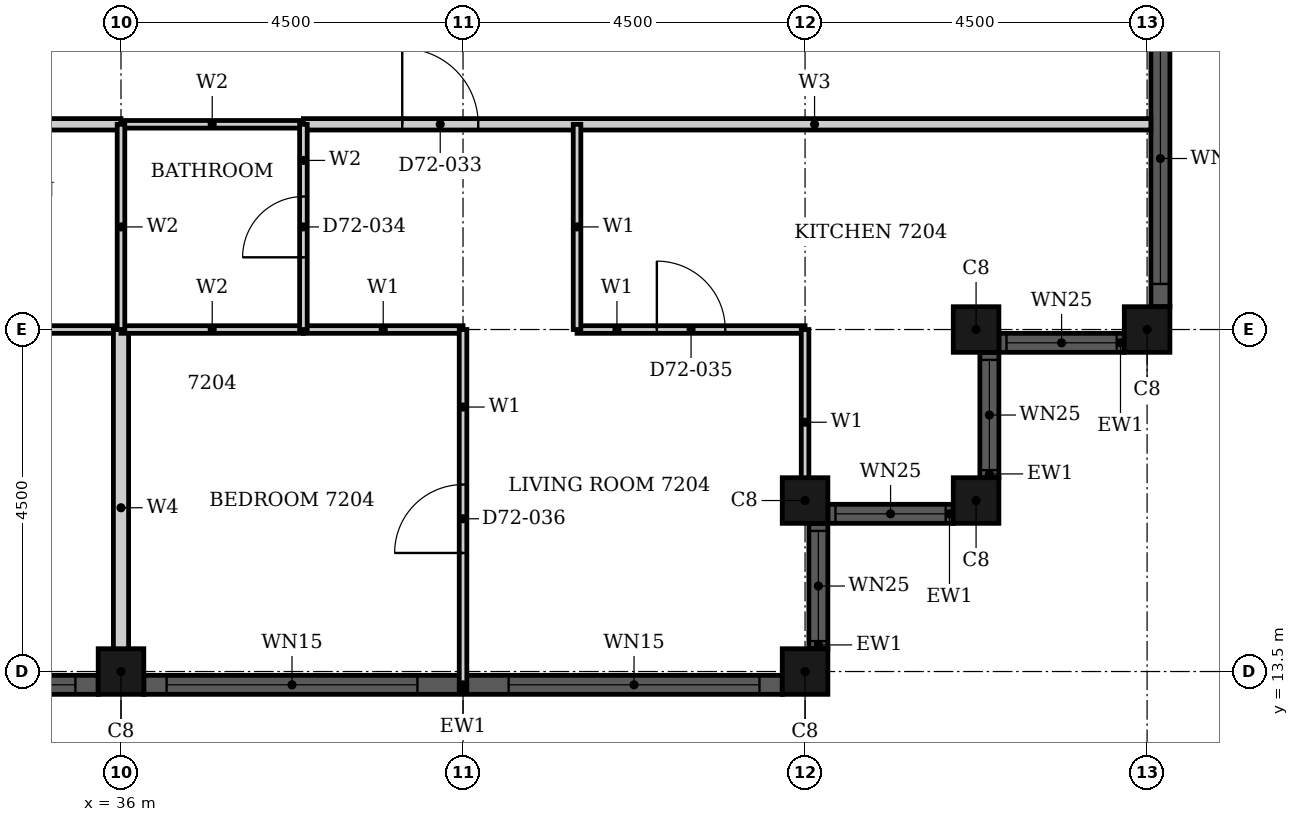
"""IFC4 building model, lengths in metres.
Left out: names, types, materials, properties, quantities, classifications, styles, units other than length and angle.
Written with IfcOpenShell. Run it as: python <this file> out.ifc"""

import sys

from ifc_helpers import new_model, si_unit, direction, frame, frame_2d, origin, origin_2d, place, context, subcontext, project, spatial, rectangle, hollow_rectangle, extrude, element, fill, save


model = new_model("IFC4")
c1 = context("Model", 3, precision=1e-05, world=origin(), true_north=direction((0.0, 1.0)))
c2 = subcontext(c1, "Body", "Model", "MODEL_VIEW")
j1 = project(units=[si_unit("LENGTHUNIT", "METRE"), si_unit("PLANEANGLEUNIT", "RADIAN")], contexts=[c1])
p1 = place(None, origin())
s1 = spatial("IfcSite", under=j1, at=p1, CompositionType="ELEMENT")
p2 = place(p1, origin())
s2 = spatial("IfcBuilding", under=s1, at=p2, CompositionType="ELEMENT")
p3 = place(p2, frame((0.0, 0.0, 283.4)))
s3 = spatial("IfcBuildingStorey", under=s2, at=p3, CompositionType="ELEMENT", Elevation=283.4)
for number, where, z_axis, x_axis in (
    (1, (45.0, 13.5, 0.0), (0.0, 0.0, 1.0), (1.0, 0.0, 0.0)),
    (2, (45.0, 15.75, 0.0), (0.0, 0.0, 1.0), (1.0, 0.0, 0.0)),
    (3, (47.25, 15.75, 0.0), (0.0, 0.0, 1.0), (1.0, 0.0, 0.0)),
    (4, (47.25, 18.0, 0.0), (0.0, 0.0, 1.0), (1.0, 0.0, 0.0)),
    (5, (49.5, 18.0, 0.0), (0.0, 0.0, 1.0), (1.0, 0.0, 0.0)),
    (6, (36.0, 13.5, 0.0), (0.0, 0.0, 1.0), (1.0, 0.0, 0.0)),
):
    element("IfcColumn", number, at=place(p3, frame(where, z_axis=z_axis, x_axis=x_axis)), inside=s3, PredefinedType="COLUMN", context=c2, shape_type="SweptSolid", body=[
        extrude(hollow_rectangle(XDim=0.6, YDim=0.6, WallThickness=0.02, at=origin_2d()), origin(), (0.0, 0.0, 1.0), 3.7),
    ])
p4 = place(p3, frame((45.175, 13.8, 0.0), z_axis=(0.0, 0.0, 1.0), x_axis=(0.0, 1.0, 0.0)))
e7 = element("IfcWall", 7, at=p4, inside=s3, PredefinedType="SOLIDWALL", context=c2, shape_type="SweptSolid", body=[
    extrude(rectangle(XDim=1.65, YDim=0.25, at=frame_2d((0.825, 0.0))), origin(), (0.0, 0.0, 1.0), 3.7),
])
p5 = place(p4, frame((0.1, 0.0, 0.9)))
e8 = element("IfcOpeningElement", 8, at=p5, cuts=e7, PredefinedType="OPENING", context=c2, shape_type="SweptSolid", body=[
    extrude(rectangle(XDim=1.45, YDim=1.85, at=frame_2d((0.725, 0.925))), frame((0.0, 0.135, 0.0), z_axis=(0.0, -1.0, 0.0), x_axis=(1.0, 0.0, 0.0)), (0.0, 0.0, 1.0), 0.27),
])
p6 = place(p3, frame((45.3, 15.575, 0.0), z_axis=(0.0, 0.0, 1.0), x_axis=(1.0, 0.0, 0.0)))
e9 = element("IfcWall", 9, at=p6, inside=s3, PredefinedType="SOLIDWALL", context=c2, shape_type="SweptSolid", body=[
    extrude(rectangle(XDim=1.65, YDim=0.25, at=frame_2d((0.825, 0.0))), origin(), (0.0, 0.0, 1.0), 3.7),
])
p7 = place(p6, frame((0.1, 0.0, 0.9)))
e10 = element("IfcOpeningElement", 10, at=p7, cuts=e9, PredefinedType="OPENING", context=c2, shape_type="SweptSolid", body=[
    extrude(rectangle(XDim=1.45, YDim=1.85, at=frame_2d((0.725, 0.925))), frame((0.0, 0.135, 0.0), z_axis=(0.0, -1.0, 0.0), x_axis=(1.0, 0.0, 0.0)), (0.0, 0.0, 1.0), 0.27),
])
p8 = place(p3, frame((47.425, 16.05, 0.0), z_axis=(0.0, 0.0, 1.0), x_axis=(0.0, 1.0, 0.0)))
e11 = element("IfcWall", 11, at=p8, inside=s3, PredefinedType="SOLIDWALL", context=c2, shape_type="SweptSolid", body=[
    extrude(rectangle(XDim=1.65, YDim=0.25, at=frame_2d((0.825, 0.0))), origin(), (0.0, 0.0, 1.0), 3.7),
])
p9 = place(p8, frame((0.1, 0.0, 0.9)))
e12 = element("IfcOpeningElement", 12, at=p9, cuts=e11, PredefinedType="OPENING", context=c2, shape_type="SweptSolid", body=[
    extrude(rectangle(XDim=1.45, YDim=1.85, at=frame_2d((0.725, 0.925))), frame((0.0, 0.135, 0.0), z_axis=(0.0, -1.0, 0.0), x_axis=(1.0, 0.0, 0.0)), (0.0, 0.0, 1.0), 0.27),
])
p10 = place(p3, frame((47.55, 17.825, 0.0), z_axis=(0.0, 0.0, 1.0), x_axis=(1.0, 0.0, 0.0)))
e13 = element("IfcWall", 13, at=p10, inside=s3, PredefinedType="SOLIDWALL", context=c2, shape_type="SweptSolid", body=[
    extrude(rectangle(XDim=1.65, YDim=0.25, at=frame_2d((0.825, 0.0))), origin(), (0.0, 0.0, 1.0), 3.7),
])
p11 = place(p10, frame((0.1, 0.0, 0.9)))
e14 = element("IfcOpeningElement", 14, at=p11, cuts=e13, PredefinedType="OPENING", context=c2, shape_type="SweptSolid", body=[
    extrude(rectangle(XDim=1.45, YDim=1.85, at=frame_2d((0.725, 0.925))), frame((0.0, 0.135, 0.0), z_axis=(0.0, -1.0, 0.0), x_axis=(1.0, 0.0, 0.0)), (0.0, 0.0, 1.0), 0.27),
])
p12 = place(p3, frame((49.675, 18.3, 0.0), z_axis=(0.0, 0.0, 1.0), x_axis=(0.0, 1.0, 0.0)))
e15 = element("IfcWall", 15, at=p12, inside=s3, PredefinedType="SOLIDWALL", context=c2, shape_type="SweptSolid", body=[
    extrude(rectangle(XDim=8.4, YDim=0.25, at=frame_2d((4.2, 0.0))), origin(), (0.0, 0.0, 1.0), 3.7),
])
p13 = place(p12, frame((0.3, 0.0, 0.45)))
e16 = element("IfcOpeningElement", 16, at=p13, cuts=e15, PredefinedType="OPENING", context=c2, shape_type="SweptSolid", body=[
    extrude(rectangle(XDim=3.3, YDim=2.3, at=frame_2d((1.65, 1.15))), frame((0.0, 0.135, 0.0), z_axis=(0.0, -1.0, 0.0), x_axis=(1.0, 0.0, 0.0)), (0.0, 0.0, 1.0), 0.27),
])
p14 = place(p12, frame((4.8, 0.0, 0.45)))
e17 = element("IfcOpeningElement", 17, at=p14, cuts=e15, PredefinedType="OPENING", context=c2, shape_type="SweptSolid", body=[
    extrude(rectangle(XDim=3.3, YDim=2.3, at=frame_2d((1.65, 1.15))), frame((0.0, 0.135, 0.0), z_axis=(0.0, -1.0, 0.0), x_axis=(1.0, 0.0, 0.0)), (0.0, 0.0, 1.0), 0.27),
])
p15 = place(p3, frame((27.3, 13.325, 0.0), z_axis=(0.0, 0.0, 1.0), x_axis=(1.0, 0.0, 0.0)))
e18 = element("IfcWall", 18, at=p15, inside=s3, PredefinedType="SOLIDWALL", context=c2, shape_type="SweptSolid", body=[
    extrude(rectangle(XDim=8.4, YDim=0.25, at=frame_2d((4.2, 0.0))), origin(), (0.0, 0.0, 1.0), 3.7),
])
p16 = place(p15, frame((0.3, 0.0, 0.45)))
e19 = element("IfcOpeningElement", 19, at=p16, cuts=e18, PredefinedType="OPENING", context=c2, shape_type="SweptSolid", body=[
    extrude(rectangle(XDim=3.3, YDim=2.3, at=frame_2d((1.65, 1.15))), frame((0.0, 0.135, 0.0), z_axis=(0.0, -1.0, 0.0), x_axis=(1.0, 0.0, 0.0)), (0.0, 0.0, 1.0), 0.27),
])
p17 = place(p15, frame((4.8, 0.0, 0.45)))
e20 = element("IfcOpeningElement", 20, at=p17, cuts=e18, PredefinedType="OPENING", context=c2, shape_type="SweptSolid", body=[
    extrude(rectangle(XDim=3.3, YDim=2.3, at=frame_2d((1.65, 1.15))), frame((0.0, 0.135, 0.0), z_axis=(0.0, -1.0, 0.0), x_axis=(1.0, 0.0, 0.0)), (0.0, 0.0, 1.0), 0.27),
])
p18 = place(p3, frame((36.3, 13.325, 0.0), z_axis=(0.0, 0.0, 1.0), x_axis=(1.0, 0.0, 0.0)))
e21 = element("IfcWall", 21, at=p18, inside=s3, PredefinedType="SOLIDWALL", context=c2, shape_type="SweptSolid", body=[
    extrude(rectangle(XDim=8.4, YDim=0.25, at=frame_2d((4.2, 0.0))), origin(), (0.0, 0.0, 1.0), 3.7),
])
p19 = place(p18, frame((0.3, 0.0, 0.45)))
e22 = element("IfcOpeningElement", 22, at=p19, cuts=e21, PredefinedType="OPENING", context=c2, shape_type="SweptSolid", body=[
    extrude(rectangle(XDim=3.3, YDim=2.3, at=frame_2d((1.65, 1.15))), frame((0.0, 0.135, 0.0), z_axis=(0.0, -1.0, 0.0), x_axis=(1.0, 0.0, 0.0)), (0.0, 0.0, 1.0), 0.27),
])
p20 = place(p18, frame((4.8, 0.0, 0.45)))
e23 = element("IfcOpeningElement", 23, at=p20, cuts=e21, PredefinedType="OPENING", context=c2, shape_type="SweptSolid", body=[
    extrude(rectangle(XDim=3.3, YDim=2.3, at=frame_2d((1.65, 1.15))), frame((0.0, 0.135, 0.0), z_axis=(0.0, -1.0, 0.0), x_axis=(1.0, 0.0, 0.0)), (0.0, 0.0, 1.0), 0.27),
])
p21 = place(p3, frame((29.4, 20.7, 0.0), z_axis=(0.0, 0.0, 1.0), x_axis=(1.0, 0.0, 0.0)))
e24 = element("IfcWall", 24, at=p21, inside=s3, PredefinedType="PARTITIONING", context=c2, shape_type="SweptSolid", body=[
    extrude(rectangle(XDim=6.6, YDim=0.15, at=frame_2d((3.3, 0.0))), origin(), (0.0, 0.0, 1.0), 3.4),
])
p22 = place(p21, frame((1.3, 0.0, 0.0)))
e25 = element("IfcOpeningElement", 25, at=p22, cuts=e24, PredefinedType="OPENING", context=c2, shape_type="SweptSolid", body=[
    extrude(rectangle(XDim=1.0, YDim=2.2, at=frame_2d((0.5, 1.1))), frame((0.0, 0.085, 0.0), z_axis=(0.0, -1.0, 0.0), x_axis=(1.0, 0.0, 0.0)), (0.0, 0.0, 1.0), 0.17),
])
p23 = place(p3, frame((38.4, 20.7, 0.0), z_axis=(0.0, 0.0, 1.0), x_axis=(1.0, 0.0, 0.0)))
e26 = element("IfcWall", 26, at=p23, inside=s3, PredefinedType="PARTITIONING", context=c2, shape_type="SweptSolid", body=[
    extrude(rectangle(XDim=11.15, YDim=0.15, at=frame_2d((5.575, 0.0))), origin(), (0.0, 0.0, 1.0), 3.4),
])
p24 = place(p23, frame((1.3, 0.0, 0.0)))
e27 = element("IfcOpeningElement", 27, at=p24, cuts=e26, PredefinedType="OPENING", context=c2, shape_type="SweptSolid", body=[
    extrude(rectangle(XDim=1.0, YDim=2.2, at=frame_2d((0.5, 1.1))), frame((0.0, 0.085, 0.0), z_axis=(0.0, -1.0, 0.0), x_axis=(1.0, 0.0, 0.0)), (0.0, 0.0, 1.0), 0.17),
])
p25 = place(p3, frame((33.0, 18.0, 0.0), z_axis=(0.0, 0.0, 1.0), x_axis=(1.0, 0.0, 0.0)))
e28 = element("IfcWall", 28, at=p25, inside=s3, PredefinedType="PARTITIONING", context=c2, shape_type="SweptSolid", body=[
    extrude(rectangle(XDim=3.0, YDim=0.1, at=frame_2d((1.5, 0.0))), origin(), (0.0, 0.0, 1.0), 3.4),
])
p26 = place(p25, frame((1.05, 0.0, 0.0)))
e29 = element("IfcOpeningElement", 29, at=p26, cuts=e28, PredefinedType="OPENING", context=c2, shape_type="SweptSolid", body=[
    extrude(rectangle(XDim=0.9, YDim=2.1, at=frame_2d((0.45, 1.05))), frame((0.0, 0.06, 0.0), z_axis=(0.0, -1.0, 0.0), x_axis=(1.0, 0.0, 0.0)), (0.0, 0.0, 1.0), 0.12),
])
p27 = place(p3, frame((38.4, 18.0, 0.0), z_axis=(0.0, 0.0, 1.0), x_axis=(1.0, 0.0, 0.0)))
e30 = element("IfcWall", 30, at=p27, inside=s3, PredefinedType="PARTITIONING", context=c2, shape_type="SweptSolid", body=[
    extrude(rectangle(XDim=2.1, YDim=0.1, at=frame_2d((1.05, 0.0))), origin(), (0.0, 0.0, 1.0), 3.4),
])
p28 = place(p3, frame((42.0, 18.0, 0.0), z_axis=(0.0, 0.0, 1.0), x_axis=(1.0, 0.0, 0.0)))
e31 = element("IfcWall", 31, at=p28, inside=s3, PredefinedType="PARTITIONING", context=c2, shape_type="SweptSolid", body=[
    extrude(rectangle(XDim=3.0, YDim=0.1, at=frame_2d((1.5, 0.0))), origin(), (0.0, 0.0, 1.0), 3.4),
])
p29 = place(p28, frame((1.05, 0.0, 0.0)))
e32 = element("IfcOpeningElement", 32, at=p29, cuts=e31, PredefinedType="OPENING", context=c2, shape_type="SweptSolid", body=[
    extrude(rectangle(XDim=0.9, YDim=2.1, at=frame_2d((0.45, 1.05))), frame((0.0, 0.06, 0.0), z_axis=(0.0, -1.0, 0.0), x_axis=(1.0, 0.0, 0.0)), (0.0, 0.0, 1.0), 0.12),
])
p30 = place(p3, frame((40.5, 13.26, 0.0), z_axis=(0.0, 0.0, 1.0), x_axis=(0.0, 1.0, 0.0)))
e33 = element("IfcWall", 33, at=p30, inside=s3, PredefinedType="PARTITIONING", context=c2, shape_type="SweptSolid", body=[
    extrude(rectangle(XDim=4.74, YDim=0.1, at=frame_2d((2.37, 0.0))), origin(), (0.0, 0.0, 1.0), 3.4),
])
p31 = place(p30, frame((1.8, 0.0, 0.0)))
e34 = element("IfcOpeningElement", 34, at=p31, cuts=e33, PredefinedType="OPENING", context=c2, shape_type="SweptSolid", body=[
    extrude(rectangle(XDim=0.9, YDim=2.1, at=frame_2d((0.45, 1.05))), frame((0.0, 0.06, 0.0), z_axis=(0.0, -1.0, 0.0), x_axis=(1.0, 0.0, 0.0)), (0.0, 0.0, 1.0), 0.12),
])
p32 = place(p3, frame((42.0, 18.0, 0.0), z_axis=(0.0, 0.0, 1.0), x_axis=(0.0, 1.0, 0.0)))
e35 = element("IfcWall", 35, at=p32, inside=s3, PredefinedType="PARTITIONING", context=c2, shape_type="SweptSolid", body=[
    extrude(rectangle(XDim=2.7, YDim=0.1, at=frame_2d((1.35, 0.0))), origin(), (0.0, 0.0, 1.0), 3.4),
])
p33 = place(p3, frame((45.0, 15.56, 0.0), z_axis=(0.0, 0.0, 1.0), x_axis=(0.0, 1.0, 0.0)))
e36 = element("IfcWall", 36, at=p33, inside=s3, PredefinedType="PARTITIONING", context=c2, shape_type="SweptSolid", body=[
    extrude(rectangle(XDim=2.44, YDim=0.1, at=frame_2d((1.22, 0.0))), origin(), (0.0, 0.0, 1.0), 3.4),
])
p34 = place(p3, frame((36.0, 13.31, 0.0), z_axis=(0.0, 0.0, 1.0), x_axis=(0.0, 1.0, 0.0)))
e37 = element("IfcWall", 37, at=p34, inside=s3, PredefinedType="PARTITIONING", context=c2, shape_type="SweptSolid", body=[
    extrude(rectangle(XDim=4.69, YDim=0.2, at=frame_2d((2.345, 0.0))), origin(), (0.0, 0.0, 1.0), 3.4),
])
for number, where, z_axis, x_axis in (
    (38, (36.0, 18.0, 0.0), (0.0, 0.0, 1.0), (1.0, 0.0, 0.0)),
    (39, (36.0, 20.7, 0.0), (0.0, 0.0, 1.0), (1.0, 0.0, 0.0)),
):
    element("IfcWall", number, at=place(p3, frame(where, z_axis=z_axis, x_axis=x_axis)), inside=s3, PredefinedType="PARTITIONING", context=c2, shape_type="SweptSolid", body=[
        extrude(rectangle(XDim=2.4, YDim=0.1, at=frame_2d((1.2, 0.0))), origin(), (0.0, 0.0, 1.0), 3.4),
    ])
p35 = place(p3, frame((36.0, 18.0, 0.0), z_axis=(0.0, 0.0, 1.0), x_axis=(0.0, 1.0, 0.0)))
e40 = element("IfcWall", 40, at=p35, inside=s3, PredefinedType="PARTITIONING", context=c2, shape_type="SweptSolid", body=[
    extrude(rectangle(XDim=2.7, YDim=0.1, at=frame_2d((1.35, 0.0))), origin(), (0.0, 0.0, 1.0), 3.4),
])
p36 = place(p3, frame((38.4, 18.0, 0.0), z_axis=(0.0, 0.0, 1.0), x_axis=(0.0, 1.0, 0.0)))
e41 = element("IfcWall", 41, at=p36, inside=s3, PredefinedType="PARTITIONING", context=c2, shape_type="SweptSolid", body=[
    extrude(rectangle(XDim=2.7, YDim=0.1, at=frame_2d((1.35, 0.0))), origin(), (0.0, 0.0, 1.0), 3.4),
])
p37 = place(p36, frame((0.95, 0.0, 0.0)))
e42 = element("IfcOpeningElement", 42, at=p37, cuts=e41, PredefinedType="OPENING", context=c2, shape_type="SweptSolid", body=[
    extrude(rectangle(XDim=0.8, YDim=2.1, at=frame_2d((0.4, 1.05))), frame((0.0, 0.06, 0.0), z_axis=(0.0, -1.0, 0.0), x_axis=(1.0, 0.0, 0.0)), (0.0, 0.0, 1.0), 0.12),
])
p38 = place(p5, origin())
e43 = element("IfcWindow", 43, at=p38, inside=s3, PartitioningType="SINGLE_PANEL", PredefinedType="WINDOW", context=c2, shape_type="SweptSolid", body=[
    extrude(rectangle(XDim=1.45, YDim=1.85, at=frame_2d((0.725, 0.925))), frame((0.0, 0.03, 0.0), z_axis=(0.0, -1.0, 0.0), x_axis=(1.0, 0.0, 0.0)), (0.0, 0.0, 1.0), 0.06),
])
fill(e8, e43)
p39 = place(p7, origin())
e44 = element("IfcWindow", 44, at=p39, inside=s3, PartitioningType="SINGLE_PANEL", PredefinedType="WINDOW", context=c2, shape_type="SweptSolid", body=[
    extrude(rectangle(XDim=1.45, YDim=1.85, at=frame_2d((0.725, 0.925))), frame((0.0, 0.03, 0.0), z_axis=(0.0, -1.0, 0.0), x_axis=(1.0, 0.0, 0.0)), (0.0, 0.0, 1.0), 0.06),
])
fill(e10, e44)
p40 = place(p9, origin())
e45 = element("IfcWindow", 45, at=p40, inside=s3, PartitioningType="SINGLE_PANEL", PredefinedType="WINDOW", context=c2, shape_type="SweptSolid", body=[
    extrude(rectangle(XDim=1.45, YDim=1.85, at=frame_2d((0.725, 0.925))), frame((0.0, 0.03, 0.0), z_axis=(0.0, -1.0, 0.0), x_axis=(1.0, 0.0, 0.0)), (0.0, 0.0, 1.0), 0.06),
])
fill(e12, e45)
p41 = place(p11, origin())
e46 = element("IfcWindow", 46, at=p41, inside=s3, PartitioningType="SINGLE_PANEL", PredefinedType="WINDOW", context=c2, shape_type="SweptSolid", body=[
    extrude(rectangle(XDim=1.45, YDim=1.85, at=frame_2d((0.725, 0.925))), frame((0.0, 0.03, 0.0), z_axis=(0.0, -1.0, 0.0), x_axis=(1.0, 0.0, 0.0)), (0.0, 0.0, 1.0), 0.06),
])
fill(e14, e46)
p42 = place(p13, origin())
e47 = element("IfcWindow", 47, at=p42, inside=s3, PartitioningType="SINGLE_PANEL", PredefinedType="WINDOW", context=c2, shape_type="SweptSolid", body=[
    extrude(rectangle(XDim=3.3, YDim=2.3, at=frame_2d((1.65, 1.15))), frame((0.0, 0.03, 0.0), z_axis=(0.0, -1.0, 0.0), x_axis=(1.0, 0.0, 0.0)), (0.0, 0.0, 1.0), 0.06),
])
fill(e16, e47)
p43 = place(p17, origin())
e48 = element("IfcWindow", 48, at=p43, inside=s3, PartitioningType="SINGLE_PANEL", PredefinedType="WINDOW", context=c2, shape_type="SweptSolid", body=[
    extrude(rectangle(XDim=3.3, YDim=2.3, at=frame_2d((1.65, 1.15))), frame((0.0, 0.03, 0.0), z_axis=(0.0, -1.0, 0.0), x_axis=(1.0, 0.0, 0.0)), (0.0, 0.0, 1.0), 0.06),
])
fill(e20, e48)
p44 = place(p19, origin())
e49 = element("IfcWindow", 49, at=p44, inside=s3, PartitioningType="SINGLE_PANEL", PredefinedType="WINDOW", context=c2, shape_type="SweptSolid", body=[
    extrude(rectangle(XDim=3.3, YDim=2.3, at=frame_2d((1.65, 1.15))), frame((0.0, 0.03, 0.0), z_axis=(0.0, -1.0, 0.0), x_axis=(1.0, 0.0, 0.0)), (0.0, 0.0, 1.0), 0.06),
])
fill(e22, e49)
p45 = place(p20, origin())
e50 = element("IfcWindow", 50, at=p45, inside=s3, PartitioningType="SINGLE_PANEL", PredefinedType="WINDOW", context=c2, shape_type="SweptSolid", body=[
    extrude(rectangle(XDim=3.3, YDim=2.3, at=frame_2d((1.65, 1.15))), frame((0.0, 0.03, 0.0), z_axis=(0.0, -1.0, 0.0), x_axis=(1.0, 0.0, 0.0)), (0.0, 0.0, 1.0), 0.06),
])
fill(e23, e50)
p46 = place(p24, origin())
e51 = element("IfcDoor", 51, at=p46, inside=s3, OperationType="SINGLE_SWING_RIGHT", PredefinedType="DOOR", context=c2, shape_type="SweptSolid", body=[
    extrude(rectangle(XDim=1.0, YDim=2.2, at=frame_2d((0.5, 1.1))), frame((0.0, 0.025, 0.0), z_axis=(0.0, -1.0, 0.0), x_axis=(1.0, 0.0, 0.0)), (0.0, 0.0, 1.0), 0.05),
])
fill(e27, e51)
p47 = place(p37, origin())
e52 = element("IfcDoor", 52, at=p47, inside=s3, OperationType="SINGLE_SWING_LEFT", PredefinedType="DOOR", context=c2, shape_type="SweptSolid", body=[
    extrude(rectangle(XDim=0.8, YDim=2.1, at=frame_2d((0.4, 1.05))), frame((0.0, 0.025, 0.0), z_axis=(0.0, -1.0, 0.0), x_axis=(1.0, 0.0, 0.0)), (0.0, 0.0, 1.0), 0.05),
])
fill(e42, e52)
p48 = place(p29, origin())
e53 = element("IfcDoor", 53, at=p48, inside=s3, OperationType="SINGLE_SWING_RIGHT", PredefinedType="DOOR", context=c2, shape_type="SweptSolid", body=[
    extrude(rectangle(XDim=0.9, YDim=2.1, at=frame_2d((0.45, 1.05))), frame((0.0, 0.025, 0.0), z_axis=(0.0, -1.0, 0.0), x_axis=(1.0, 0.0, 0.0)), (0.0, 0.0, 1.0), 0.05),
])
fill(e32, e53)
p49 = place(p31, origin())
e54 = element("IfcDoor", 54, at=p49, inside=s3, OperationType="SINGLE_SWING_RIGHT", PredefinedType="DOOR", context=c2, shape_type="SweptSolid", body=[
    extrude(rectangle(XDim=0.9, YDim=2.1, at=frame_2d((0.45, 1.05))), frame((0.0, 0.025, 0.0), z_axis=(0.0, -1.0, 0.0), x_axis=(1.0, 0.0, 0.0)), (0.0, 0.0, 1.0), 0.05),
])
fill(e34, e54)
save(model, sys.argv[1])
